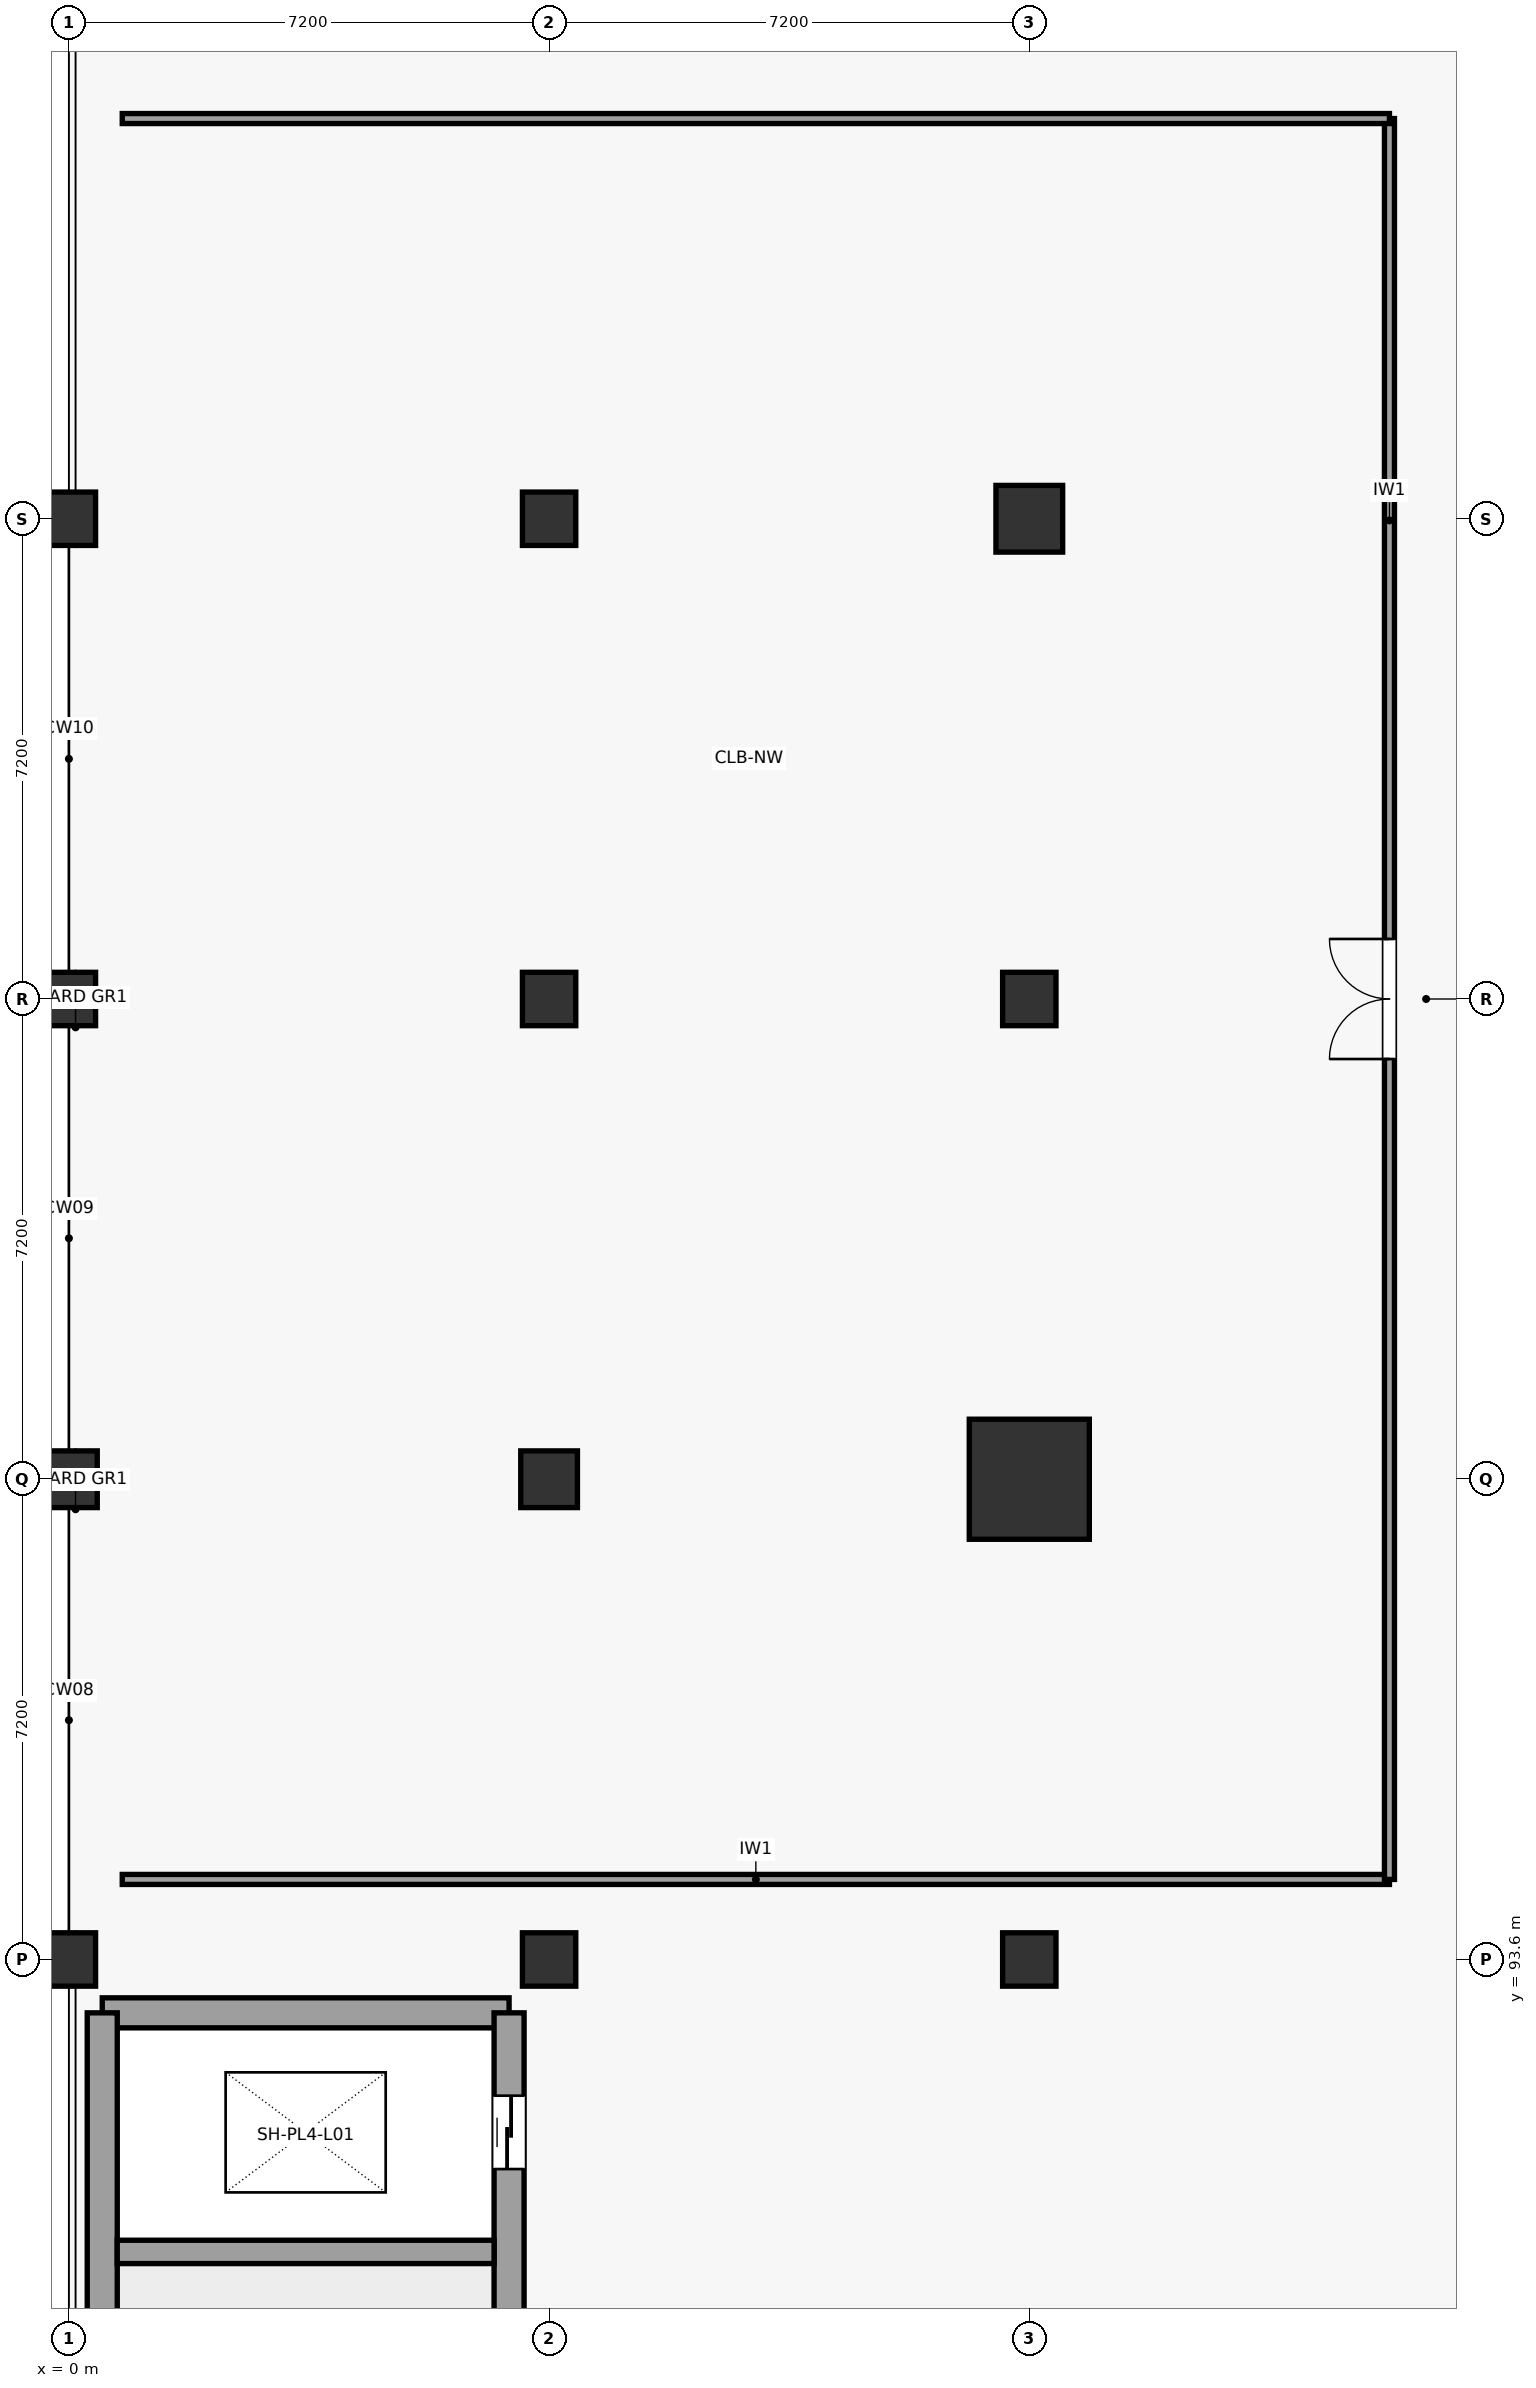
"""IFC4 building model, lengths in metres.
Left out: names, types, materials, properties, quantities, classifications, styles, units other than length and angle.
Written with IfcOpenShell. Run it as: python <this file> out.ifc"""

import sys

from ifc_helpers import new_model, si_unit, direction, frame, frame_2d, origin, origin_2d, place, context, subcontext, project, spatial, rectangle, circle, extrude, element, fill, save


model = new_model("IFC4")
c1 = context("Model", 3, precision=1e-05, world=origin(), true_north=direction((0.0, 1.0)))
c2 = subcontext(c1, "Body", "Model", "MODEL_VIEW")
j1 = project(units=[si_unit("LENGTHUNIT", "METRE"), si_unit("PLANEANGLEUNIT", "RADIAN")], contexts=[c1])
p1 = place(None, origin())
s1 = spatial("IfcSite", under=j1, at=p1, CompositionType="ELEMENT")
p2 = place(p1, origin())
s2 = spatial("IfcBuilding", under=s1, at=p2, CompositionType="ELEMENT")
p3 = place(p2, frame((0.0, 0.0, 5.4)))
s3 = spatial("IfcBuildingStorey", under=s2, at=p3, CompositionType="ELEMENT", Elevation=5.4)
p4 = place(p3, frame((0.0, 93.6, 0.0), z_axis=(0.0, 0.0, 1.0), x_axis=(1.0, 0.0, 0.0)))
e1 = element("IfcColumn", 1, at=p4, inside=s3, PredefinedType="COLUMN", context=c2, shape_type="SweptSolid", body=[
    extrude(circle(Radius=0.4, at=origin_2d()), origin(), (0.0, 0.0, 1.0), 4.2),
])
p5 = place(p3, frame((0.0, 100.8, 0.0), z_axis=(0.0, 0.0, 1.0), x_axis=(1.0, 0.0, 0.0)))
e2 = element("IfcColumn", 2, at=p5, inside=s3, PredefinedType="COLUMN", context=c2, shape_type="SweptSolid", body=[
    extrude(rectangle(XDim=0.85, YDim=0.85, at=origin_2d()), origin(), (0.0, 0.0, 1.0), 4.2),
])
p6 = place(p3, frame((0.0, 108.0, 0.0), z_axis=(0.0, 0.0, 1.0), x_axis=(1.0, 0.0, 0.0)))
e3 = element("IfcColumn", 3, at=p6, inside=s3, PredefinedType="COLUMN", context=c2, shape_type="SweptSolid", body=[
    extrude(rectangle(XDim=0.8, YDim=0.8, at=origin_2d()), origin(), (0.0, 0.0, 1.0), 4.2),
])
for number, where, z_axis, x_axis in (
    (4, (0.0, 115.2, 0.0), (0.0, 0.0, 1.0), (1.0, 0.0, 0.0)),
    (5, (7.2, 93.6, 0.0), (0.0, 0.0, 1.0), (1.0, 0.0, 0.0)),
):
    element("IfcColumn", number, at=place(p3, frame(where, z_axis=z_axis, x_axis=x_axis)), inside=s3, PredefinedType="COLUMN", context=c2, shape_type="SweptSolid", body=[
        extrude(circle(Radius=0.4, at=origin_2d()), origin(), (0.0, 0.0, 1.0), 4.2),
    ])
p7 = place(p3, frame((7.2, 100.8, 0.0), z_axis=(0.0, 0.0, 1.0), x_axis=(1.0, 0.0, 0.0)))
e6 = element("IfcColumn", 6, at=p7, inside=s3, PredefinedType="COLUMN", context=c2, shape_type="SweptSolid", body=[
    extrude(rectangle(XDim=0.85, YDim=0.85, at=origin_2d()), origin(), (0.0, 0.0, 1.0), 4.2),
])
p8 = place(p3, frame((7.2, 108.0, 0.0), z_axis=(0.0, 0.0, 1.0), x_axis=(1.0, 0.0, 0.0)))
e7 = element("IfcColumn", 7, at=p8, inside=s3, PredefinedType="COLUMN", context=c2, shape_type="SweptSolid", body=[
    extrude(rectangle(XDim=0.8, YDim=0.8, at=origin_2d()), origin(), (0.0, 0.0, 1.0), 4.2),
])
for number, where, z_axis, x_axis in (
    (8, (7.2, 115.2, 0.0), (0.0, 0.0, 1.0), (1.0, 0.0, 0.0)),
    (9, (14.4, 93.6, 0.0), (0.0, 0.0, 1.0), (1.0, 0.0, 0.0)),
):
    element("IfcColumn", number, at=place(p3, frame(where, z_axis=z_axis, x_axis=x_axis)), inside=s3, PredefinedType="COLUMN", context=c2, shape_type="SweptSolid", body=[
        extrude(circle(Radius=0.4, at=origin_2d()), origin(), (0.0, 0.0, 1.0), 4.2),
    ])
p9 = place(p3, frame((14.4, 100.8, 0.0), z_axis=(0.0, 0.0, 1.0), x_axis=(1.0, 0.0, 0.0)))
e10 = element("IfcColumn", 10, at=p9, inside=s3, PredefinedType="COLUMN", context=c2, shape_type="SweptSolid", body=[
    extrude(circle(Radius=0.9, at=origin_2d()), origin(), (0.0, 0.0, 1.0), 4.2),
])
p10 = place(p3, frame((14.4, 108.0, 0.0), z_axis=(0.0, 0.0, 1.0), x_axis=(1.0, 0.0, 0.0)))
e11 = element("IfcColumn", 11, at=p10, inside=s3, PredefinedType="COLUMN", context=c2, shape_type="SweptSolid", body=[
    extrude(rectangle(XDim=0.8, YDim=0.8, at=origin_2d()), origin(), (0.0, 0.0, 1.0), 4.2),
])
p11 = place(p3, frame((14.4, 115.2, 0.0), z_axis=(0.0, 0.0, 1.0), x_axis=(1.0, 0.0, 0.0)))
e12 = element("IfcColumn", 12, at=p11, inside=s3, PredefinedType="COLUMN", context=c2, shape_type="SweptSolid", body=[
    extrude(circle(Radius=0.5, at=origin_2d()), origin(), (0.0, 0.0, 1.0), 4.2),
])
p12 = place(p3, frame((0.5, 92.8, 0.0), z_axis=(0.0, 0.0, 1.0), x_axis=(1.0, 0.0, 0.0)))
e13 = element("IfcWall", 13, at=p12, inside=s3, PredefinedType="SHEAR", context=c2, shape_type="SweptSolid", body=[
    extrude(rectangle(XDim=6.1, YDim=0.45, at=frame_2d((3.05, 0.0))), origin(), (0.0, 0.0, 1.0), 3.92),
])
p13 = place(p3, frame((0.5, 80.0, 0.0), z_axis=(0.0, 0.0, 1.0), x_axis=(0.0, 1.0, 0.0)))
e14 = element("IfcWall", 14, at=p13, inside=s3, PredefinedType="SHEAR", context=c2, shape_type="SweptSolid", body=[
    extrude(rectangle(XDim=12.8, YDim=0.45, at=frame_2d((6.4, 0.0))), origin(), (0.0, 0.0, 1.0), 3.92),
])
p14 = place(p3, frame((6.6, 80.0, 0.0), z_axis=(0.0, 0.0, 1.0), x_axis=(0.0, 1.0, 0.0)))
e15 = element("IfcWall", 15, at=p14, inside=s3, PredefinedType="SHEAR", context=c2, shape_type="SweptSolid", body=[
    extrude(rectangle(XDim=12.8, YDim=0.45, at=frame_2d((6.4, 0.0))), origin(), (0.0, 0.0, 1.0), 3.92),
])
p15 = place(p14, frame((0.55, 0.0, 0.0)))
e16 = element("IfcOpeningElement", 16, at=p15, cuts=e15, PredefinedType="OPENING", context=c2, shape_type="SweptSolid", body=[
    extrude(rectangle(XDim=1.2, YDim=2.25, at=frame_2d((0.6, 1.125))), frame((0.0, 0.235, 0.0), z_axis=(0.0, -1.0, 0.0), x_axis=(1.0, 0.0, 0.0)), (0.0, 0.0, 1.0), 0.47),
])
p16 = place(p14, frame((10.458, 0.0, 0.0)))
e17 = element("IfcOpeningElement", 17, at=p16, cuts=e15, PredefinedType="OPENING", context=c2, shape_type="SweptSolid", body=[
    extrude(rectangle(XDim=1.1, YDim=2.2, at=frame_2d((0.55, 1.1))), frame((0.0, 0.235, 0.0), z_axis=(0.0, -1.0, 0.0), x_axis=(1.0, 0.0, 0.0)), (0.0, 0.0, 1.0), 0.47),
])
p17 = place(p3, frame((0.725, 89.216, 0.0), z_axis=(0.0, 0.0, 1.0), x_axis=(1.0, 0.0, 0.0)))
e18 = element("IfcWall", 18, at=p17, inside=s3, PredefinedType="SHEAR", context=c2, shape_type="SweptSolid", body=[
    extrude(rectangle(XDim=5.65, YDim=0.35, at=frame_2d((2.825, 0.0))), origin(), (0.0, 0.0, 1.0), 3.92),
])
p18 = place(p3, frame((0.8, 94.8, 0.0), z_axis=(0.0, 0.0, 1.0), x_axis=(1.0, 0.0, 0.0)))
e19 = element("IfcWall", 19, at=p18, inside=s3, PredefinedType="PARTITIONING", context=c2, shape_type="SweptSolid", body=[
    extrude(rectangle(XDim=19.0, YDim=0.15, at=frame_2d((9.5, 0.0))), origin(), (0.0, 0.0, 1.0), 2.98),
])
p19 = place(p3, frame((19.8, 94.8, 0.0), z_axis=(0.0, 0.0, 1.0), x_axis=(0.0, 1.0, 0.0)))
e20 = element("IfcWall", 20, at=p19, inside=s3, PredefinedType="PARTITIONING", context=c2, shape_type="SweptSolid", body=[
    extrude(rectangle(XDim=26.4, YDim=0.15, at=frame_2d((13.2, 0.0))), origin(), (0.0, 0.0, 1.0), 2.98),
])
p20 = place(p19, frame((12.3, 0.0, 0.0)))
e21 = element("IfcOpeningElement", 21, at=p20, cuts=e20, PredefinedType="OPENING", context=c2, shape_type="SweptSolid", body=[
    extrude(rectangle(XDim=1.8, YDim=2.3, at=frame_2d((0.9, 1.15))), frame((0.0, 0.085, 0.0), z_axis=(0.0, -1.0, 0.0), x_axis=(1.0, 0.0, 0.0)), (0.0, 0.0, 1.0), 0.17),
])
p21 = place(p3, frame((19.8, 121.2, 0.0), z_axis=(0.0, 0.0, 1.0), x_axis=(-1.0, 0.0, 0.0)))
e22 = element("IfcWall", 22, at=p21, inside=s3, PredefinedType="PARTITIONING", context=c2, shape_type="SweptSolid", body=[
    extrude(rectangle(XDim=19.0, YDim=0.15, at=frame_2d((9.5, 0.0))), origin(), (0.0, 0.0, 1.0), 2.98),
])
p22 = place(p16, origin())
e23 = element("IfcDoor", 23, at=p22, inside=s3, OperationType="SLIDING_TO_LEFT", PredefinedType="DOOR", context=c2, shape_type="SweptSolid", body=[
    extrude(rectangle(XDim=1.1, YDim=2.2, at=frame_2d((0.55, 1.1))), frame((0.0, 0.025, 0.0), z_axis=(0.0, -1.0, 0.0), x_axis=(1.0, 0.0, 0.0)), (0.0, 0.0, 1.0), 0.05),
])
fill(e17, e23)
p23 = place(p20, origin())
e24 = element("IfcDoor", 24, at=p23, inside=s3, OperationType="DOUBLE_DOOR_SINGLE_SWING", PredefinedType="DOOR", context=c2, shape_type="SweptSolid", body=[
    extrude(rectangle(XDim=1.8, YDim=2.3, at=frame_2d((0.9, 1.15))), frame((0.0, 0.025, 0.0), z_axis=(0.0, -1.0, 0.0), x_axis=(1.0, 0.0, 0.0)), (0.0, 0.0, 1.0), 0.05),
])
fill(e21, e24)
save(model, sys.argv[1])
